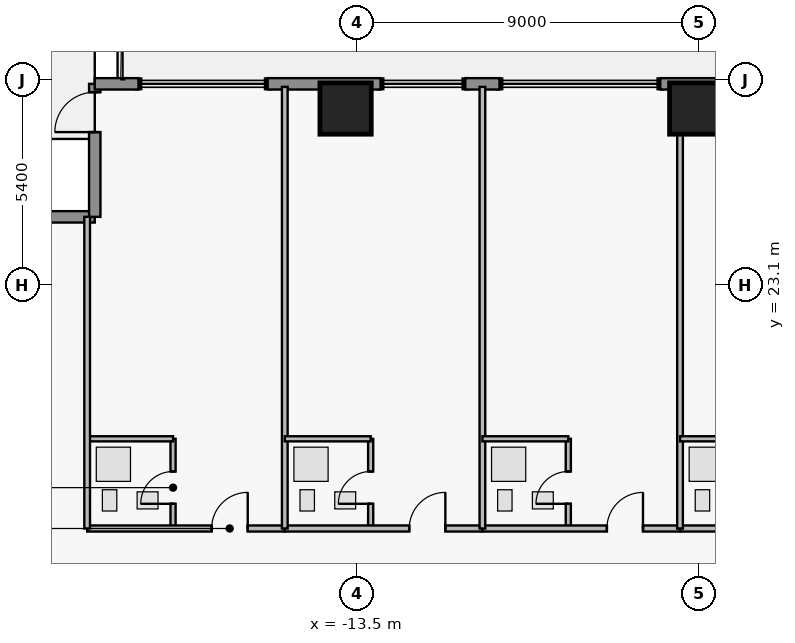
"""IFC4 building model, lengths in metres.
Left out: names, types, materials, properties, quantities, classifications, styles, units other than length and angle.
Written with IfcOpenShell. Run it as: python <this file> out.ifc"""

import sys

from ifc_helpers import new_model, si_unit, direction, frame, frame_2d, origin, origin_2d, place, context, subcontext, project, spatial, rectangle, extrude, element, fill, save


model = new_model("IFC4")
c1 = context("Model", 3, precision=1e-05, world=origin(), true_north=direction((0.0, 1.0)))
c2 = subcontext(c1, "Body", "Model", "MODEL_VIEW")
j1 = project(units=[si_unit("LENGTHUNIT", "METRE"), si_unit("PLANEANGLEUNIT", "RADIAN")], contexts=[c1])
p1 = place(None, origin())
s1 = spatial("IfcSite", under=j1, at=p1, CompositionType="ELEMENT")
p2 = place(p1, origin())
s2 = spatial("IfcBuilding", under=s1, at=p2, CompositionType="ELEMENT")
p3 = place(p2, frame((0.0, 0.0, 110.25)))
s3 = spatial("IfcBuildingStorey", under=s2, at=p3, CompositionType="ELEMENT", Elevation=110.25)
for number, where, z_axis, x_axis in (
    (1, (-13.8, 27.75, 0.0), (0.0, 0.0, 1.0), (1.0, 0.0, 0.0)),
    (2, (-4.6, 27.75, 0.0), (0.0, 0.0, 1.0), (1.0, 0.0, 0.0)),
):
    element("IfcColumn", number, at=place(p3, frame(where, z_axis=z_axis, x_axis=x_axis)), inside=s3, PredefinedType="COLUMN", context=c2, shape_type="SweptSolid", body=[
        extrude(rectangle(XDim=1.35, YDim=1.35, at=origin_2d()), origin(), (0.0, 0.0, 1.0), 3.65),
    ])
p4 = place(p3, frame((-23.9, 24.9, 0.0), z_axis=(0.0, 0.0, 1.0), x_axis=(1.0, 0.0, 0.0)))
e3 = element("IfcWall", 3, at=p4, inside=s3, PredefinedType="STANDARD", context=c2, shape_type="SweptSolid", body=[
    extrude(rectangle(XDim=3.5, YDim=0.3, at=frame_2d((1.75, 0.0))), origin(), (0.0, 0.0, 1.0), 3.43),
])
p5 = place(p3, frame((-20.4, 24.9, 0.0), z_axis=(0.0, 0.0, 1.0), x_axis=(0.0, 1.0, 0.0)))
e4 = element("IfcWall", 4, at=p5, inside=s3, PredefinedType="STANDARD", context=c2, shape_type="SweptSolid", body=[
    extrude(rectangle(XDim=3.5, YDim=0.3, at=frame_2d((1.75, 0.0))), origin(), (0.0, 0.0, 1.0), 3.43),
])
p6 = place(p5, frame((2.23, 0.0, 0.0)))
e5 = element("IfcOpeningElement", 5, at=p6, cuts=e4, PredefinedType="OPENING", context=c2, shape_type="SweptSolid", body=[
    extrude(rectangle(XDim=1.05, YDim=2.2, at=frame_2d((0.525, 1.1))), frame((0.0, 0.16, 0.0), z_axis=(0.0, -1.0, 0.0), x_axis=(1.0, 0.0, 0.0)), (0.0, 0.0, 1.0), 0.32),
])
p7 = place(p3, frame((-20.4, 28.4, 0.0), z_axis=(0.0, 0.0, 1.0), x_axis=(1.0, 0.0, 0.0)))
e6 = element("IfcWall", 6, at=p7, inside=s3, PredefinedType="STANDARD", context=c2, shape_type="SweptSolid", body=[
    extrude(rectangle(XDim=1.15, YDim=0.3, at=frame_2d((0.575, 0.0))), origin(), (0.0, 0.0, 1.0), 3.43),
])
p8 = place(p3, frame((-15.85, 28.4, 0.0), z_axis=(0.0, 0.0, 1.0), x_axis=(1.0, 0.0, 0.0)))
e7 = element("IfcWall", 7, at=p8, inside=s3, PredefinedType="STANDARD", context=c2, shape_type="SweptSolid", body=[
    extrude(rectangle(XDim=2.97, YDim=0.3, at=frame_2d((1.485, 0.0))), origin(), (0.0, 0.0, 1.0), 3.43),
])
p9 = place(p3, frame((-10.65, 28.4, 0.0), z_axis=(0.0, 0.0, 1.0), x_axis=(1.0, 0.0, 0.0)))
e8 = element("IfcWall", 8, at=p9, inside=s3, PredefinedType="STANDARD", context=c2, shape_type="SweptSolid", body=[
    extrude(rectangle(XDim=0.9, YDim=0.3, at=frame_2d((0.45, 0.0))), origin(), (0.0, 0.0, 1.0), 3.43),
])
p10 = place(p3, frame((-5.52, 28.4, 0.0), z_axis=(0.0, 0.0, 1.0), x_axis=(1.0, 0.0, 0.0)))
e9 = element("IfcWall", 9, at=p10, inside=s3, PredefinedType="STANDARD", context=c2, shape_type="SweptSolid", body=[
    extrude(rectangle(XDim=1.84, YDim=0.3, at=frame_2d((0.92, 0.0))), origin(), (0.0, 0.0, 1.0), 3.43),
])
p11 = place(p3, frame((-18.34, 16.7, 0.0), z_axis=(0.0, 0.0, 1.0), x_axis=(0.0, 1.0, 0.0)))
e10 = element("IfcWall", 10, at=p11, inside=s3, PredefinedType="PLUMBINGWALL", context=c2, shape_type="SweptSolid", body=[
    extrude(rectangle(XDim=2.36, YDim=0.135, at=frame_2d((1.18, 0.0))), origin(), (0.0, 0.0, 1.0), 3.43),
])
p12 = place(p11, frame((0.65, 0.0, 0.0)))
e11 = element("IfcOpeningElement", 11, at=p12, cuts=e10, PredefinedType="OPENING", context=c2, shape_type="SweptSolid", body=[
    extrude(rectangle(XDim=0.85, YDim=2.1, at=frame_2d((0.425, 1.05))), frame((0.0, 0.077, 0.0), z_axis=(0.0, -1.0, 0.0), x_axis=(1.0, 0.0, 0.0)), (0.0, 0.0, 1.0), 0.155),
])
p13 = place(p3, frame((-20.6, 16.7, 0.0), z_axis=(0.0, 0.0, 1.0), x_axis=(1.0, 0.0, 0.0)))
e12 = element("IfcWall", 12, at=p13, inside=s3, PredefinedType="PARTITIONING", context=c2, shape_type="SweptSolid", body=[
    extrude(rectangle(XDim=5.2, YDim=0.16, at=frame_2d((2.6, 0.0))), origin(), (0.0, 0.0, 1.0), 3.43),
])
p14 = place(p13, frame((3.275, 0.0, 0.0)))
e13 = element("IfcOpeningElement", 13, at=p14, cuts=e12, PredefinedType="OPENING", context=c2, shape_type="SweptSolid", body=[
    extrude(rectangle(XDim=0.95, YDim=2.15, at=frame_2d((0.475, 1.075))), frame((0.0, 0.09, 0.0), z_axis=(0.0, -1.0, 0.0), x_axis=(1.0, 0.0, 0.0)), (0.0, 0.0, 1.0), 0.18),
])
p15 = place(p3, frame((-13.14, 16.7, 0.0), z_axis=(0.0, 0.0, 1.0), x_axis=(0.0, 1.0, 0.0)))
e14 = element("IfcWall", 14, at=p15, inside=s3, PredefinedType="PLUMBINGWALL", context=c2, shape_type="SweptSolid", body=[
    extrude(rectangle(XDim=2.36, YDim=0.135, at=frame_2d((1.18, 0.0))), origin(), (0.0, 0.0, 1.0), 3.43),
])
p16 = place(p15, frame((0.65, 0.0, 0.0)))
e15 = element("IfcOpeningElement", 15, at=p16, cuts=e14, PredefinedType="OPENING", context=c2, shape_type="SweptSolid", body=[
    extrude(rectangle(XDim=0.85, YDim=2.1, at=frame_2d((0.425, 1.05))), frame((0.0, 0.077, 0.0), z_axis=(0.0, -1.0, 0.0), x_axis=(1.0, 0.0, 0.0)), (0.0, 0.0, 1.0), 0.155),
])
p17 = place(p3, frame((-15.4, 16.7, 0.0), z_axis=(0.0, 0.0, 1.0), x_axis=(1.0, 0.0, 0.0)))
e16 = element("IfcWall", 16, at=p17, inside=s3, PredefinedType="PARTITIONING", context=c2, shape_type="SweptSolid", body=[
    extrude(rectangle(XDim=5.2, YDim=0.16, at=frame_2d((2.6, 0.0))), origin(), (0.0, 0.0, 1.0), 2.973),
])
p18 = place(p17, frame((3.275, 0.0, 0.0)))
e17 = element("IfcOpeningElement", 17, at=p18, cuts=e16, PredefinedType="OPENING", context=c2, shape_type="SweptSolid", body=[
    extrude(rectangle(XDim=0.95, YDim=2.15, at=frame_2d((0.475, 1.075))), frame((0.0, 0.09, 0.0), z_axis=(0.0, -1.0, 0.0), x_axis=(1.0, 0.0, 0.0)), (0.0, 0.0, 1.0), 0.18),
])
p19 = place(p3, frame((-7.94, 16.7, 0.0), z_axis=(0.0, 0.0, 1.0), x_axis=(0.0, 1.0, 0.0)))
e18 = element("IfcWall", 18, at=p19, inside=s3, PredefinedType="PLUMBINGWALL", context=c2, shape_type="SweptSolid", body=[
    extrude(rectangle(XDim=2.36, YDim=0.135, at=frame_2d((1.18, 0.0))), origin(), (0.0, 0.0, 1.0), 3.43),
])
p20 = place(p19, frame((0.65, 0.0, 0.0)))
e19 = element("IfcOpeningElement", 19, at=p20, cuts=e18, PredefinedType="OPENING", context=c2, shape_type="SweptSolid", body=[
    extrude(rectangle(XDim=0.85, YDim=2.1, at=frame_2d((0.425, 1.05))), frame((0.0, 0.077, 0.0), z_axis=(0.0, -1.0, 0.0), x_axis=(1.0, 0.0, 0.0)), (0.0, 0.0, 1.0), 0.155),
])
p21 = place(p3, frame((-10.2, 16.7, 0.0), z_axis=(0.0, 0.0, 1.0), x_axis=(1.0, 0.0, 0.0)))
e20 = element("IfcWall", 20, at=p21, inside=s3, PredefinedType="PARTITIONING", context=c2, shape_type="SweptSolid", body=[
    extrude(rectangle(XDim=5.2, YDim=0.16, at=frame_2d((2.6, 0.0))), origin(), (0.0, 0.0, 1.0), 2.973),
])
p22 = place(p21, frame((3.275, 0.0, 0.0)))
e21 = element("IfcOpeningElement", 21, at=p22, cuts=e20, PredefinedType="OPENING", context=c2, shape_type="SweptSolid", body=[
    extrude(rectangle(XDim=0.95, YDim=2.15, at=frame_2d((0.475, 1.075))), frame((0.0, 0.09, 0.0), z_axis=(0.0, -1.0, 0.0), x_axis=(1.0, 0.0, 0.0)), (0.0, 0.0, 1.0), 0.18),
])
p23 = place(p3, frame((-5.0, 16.7, 0.0), z_axis=(0.0, 0.0, 1.0), x_axis=(1.0, 0.0, 0.0)))
e22 = element("IfcWall", 22, at=p23, inside=s3, PredefinedType="PARTITIONING", context=c2, shape_type="SweptSolid", body=[
    extrude(rectangle(XDim=5.2, YDim=0.16, at=frame_2d((2.6, 0.0))), origin(), (0.0, 0.0, 1.0), 2.973),
])
p24 = place(p23, frame((3.275, 0.0, 0.0)))
e23 = element("IfcOpeningElement", 23, at=p24, cuts=e22, PredefinedType="OPENING", context=c2, shape_type="SweptSolid", body=[
    extrude(rectangle(XDim=0.95, YDim=2.15, at=frame_2d((0.475, 1.075))), frame((0.0, 0.09, 0.0), z_axis=(0.0, -1.0, 0.0), x_axis=(1.0, 0.0, 0.0)), (0.0, 0.0, 1.0), 0.18),
])
p25 = place(p3, frame((-20.6, 19.06, 0.0), z_axis=(0.0, 0.0, 1.0), x_axis=(1.0, 0.0, 0.0)))
e24 = element("IfcWall", 24, at=p25, inside=s3, PredefinedType="PLUMBINGWALL", context=c2, shape_type="SweptSolid", body=[
    extrude(rectangle(XDim=2.26, YDim=0.135, at=frame_2d((1.13, 0.0))), origin(), (0.0, 0.0, 1.0), 3.43),
])
p26 = place(p3, frame((-20.6, 16.7, 0.0), z_axis=(0.0, 0.0, 1.0), x_axis=(0.0, 1.0, 0.0)))
e25 = element("IfcWall", 25, at=p26, inside=s3, PredefinedType="PARTITIONING", context=c2, shape_type="SweptSolid", body=[
    extrude(rectangle(XDim=8.2, YDim=0.15, at=frame_2d((4.1, 0.0))), origin(), (0.0, 0.0, 1.0), 3.43),
])
p27 = place(p3, frame((-15.4, 16.7, 0.0), z_axis=(0.0, 0.0, 1.0), x_axis=(0.0, 1.0, 0.0)))
e26 = element("IfcWall", 26, at=p27, inside=s3, PredefinedType="PARTITIONING", context=c2, shape_type="SweptSolid", body=[
    extrude(rectangle(XDim=11.62, YDim=0.15, at=frame_2d((5.81, 0.0))), origin(), (0.0, 0.0, 1.0), 3.43),
])
p28 = place(p3, frame((-15.4, 19.06, 0.0), z_axis=(0.0, 0.0, 1.0), x_axis=(1.0, 0.0, 0.0)))
e27 = element("IfcWall", 27, at=p28, inside=s3, PredefinedType="PLUMBINGWALL", context=c2, shape_type="SweptSolid", body=[
    extrude(rectangle(XDim=2.26, YDim=0.135, at=frame_2d((1.13, 0.0))), origin(), (0.0, 0.0, 1.0), 2.973),
])
p29 = place(p3, frame((-10.2, 16.7, 0.0), z_axis=(0.0, 0.0, 1.0), x_axis=(0.0, 1.0, 0.0)))
e28 = element("IfcWall", 28, at=p29, inside=s3, PredefinedType="PARTITIONING", context=c2, shape_type="SweptSolid", body=[
    extrude(rectangle(XDim=11.62, YDim=0.15, at=frame_2d((5.81, 0.0))), origin(), (0.0, 0.0, 1.0), 3.43),
])
p30 = place(p3, frame((-10.2, 19.06, 0.0), z_axis=(0.0, 0.0, 1.0), x_axis=(1.0, 0.0, 0.0)))
e29 = element("IfcWall", 29, at=p30, inside=s3, PredefinedType="PLUMBINGWALL", context=c2, shape_type="SweptSolid", body=[
    extrude(rectangle(XDim=2.26, YDim=0.135, at=frame_2d((1.13, 0.0))), origin(), (0.0, 0.0, 1.0), 2.973),
])
p31 = place(p3, frame((-5.0, 16.7, 0.0), z_axis=(0.0, 0.0, 1.0), x_axis=(0.0, 1.0, 0.0)))
e30 = element("IfcWall", 30, at=p31, inside=s3, PredefinedType="PARTITIONING", context=c2, shape_type="SweptSolid", body=[
    extrude(rectangle(XDim=11.62, YDim=0.15, at=frame_2d((5.81, 0.0))), origin(), (0.0, 0.0, 1.0), 2.503),
])
p32 = place(p3, frame((-5.0, 19.06, 0.0), z_axis=(0.0, 0.0, 1.0), x_axis=(1.0, 0.0, 0.0)))
e31 = element("IfcWall", 31, at=p32, inside=s3, PredefinedType="PLUMBINGWALL", context=c2, shape_type="SweptSolid", body=[
    extrude(rectangle(XDim=2.26, YDim=0.135, at=frame_2d((1.13, 0.0))), origin(), (0.0, 0.0, 1.0), 2.973),
])
p33 = place(p6, origin())
e32 = element("IfcDoor", 32, at=p33, inside=s3, OperationType="SINGLE_SWING_LEFT", PredefinedType="DOOR", context=c2, shape_type="SweptSolid", body=[
    extrude(rectangle(XDim=1.05, YDim=2.2, at=frame_2d((0.525, 1.1))), frame((0.0, 0.025, 0.0), z_axis=(0.0, -1.0, 0.0), x_axis=(1.0, 0.0, 0.0)), (0.0, 0.0, 1.0), 0.05),
])
fill(e5, e32)
p34 = place(p12, origin())
e33 = element("IfcDoor", 33, at=p34, inside=s3, OperationType="SINGLE_SWING_LEFT", PredefinedType="DOOR", context=c2, shape_type="SweptSolid", body=[
    extrude(rectangle(XDim=0.85, YDim=2.1, at=frame_2d((0.425, 1.05))), frame((0.0, 0.025, 0.0), z_axis=(0.0, -1.0, 0.0), x_axis=(1.0, 0.0, 0.0)), (0.0, 0.0, 1.0), 0.05),
])
fill(e11, e33)
p35 = place(p14, origin())
e34 = element("IfcDoor", 34, at=p35, inside=s3, OperationType="SINGLE_SWING_RIGHT", PredefinedType="DOOR", context=c2, shape_type="SweptSolid", body=[
    extrude(rectangle(XDim=0.95, YDim=2.15, at=frame_2d((0.475, 1.075))), frame((0.0, 0.025, 0.0), z_axis=(0.0, -1.0, 0.0), x_axis=(1.0, 0.0, 0.0)), (0.0, 0.0, 1.0), 0.05),
])
fill(e13, e34)
p36 = place(p16, origin())
e35 = element("IfcDoor", 35, at=p36, inside=s3, OperationType="SINGLE_SWING_LEFT", PredefinedType="DOOR", context=c2, shape_type="SweptSolid", body=[
    extrude(rectangle(XDim=0.85, YDim=2.1, at=frame_2d((0.425, 1.05))), frame((0.0, 0.025, 0.0), z_axis=(0.0, -1.0, 0.0), x_axis=(1.0, 0.0, 0.0)), (0.0, 0.0, 1.0), 0.05),
])
fill(e15, e35)
p37 = place(p18, origin())
e36 = element("IfcDoor", 36, at=p37, inside=s3, OperationType="SINGLE_SWING_RIGHT", PredefinedType="DOOR", context=c2, shape_type="SweptSolid", body=[
    extrude(rectangle(XDim=0.95, YDim=2.15, at=frame_2d((0.475, 1.075))), frame((0.0, 0.025, 0.0), z_axis=(0.0, -1.0, 0.0), x_axis=(1.0, 0.0, 0.0)), (0.0, 0.0, 1.0), 0.05),
])
fill(e17, e36)
p38 = place(p20, origin())
e37 = element("IfcDoor", 37, at=p38, inside=s3, OperationType="SINGLE_SWING_LEFT", PredefinedType="DOOR", context=c2, shape_type="SweptSolid", body=[
    extrude(rectangle(XDim=0.85, YDim=2.1, at=frame_2d((0.425, 1.05))), frame((0.0, 0.025, 0.0), z_axis=(0.0, -1.0, 0.0), x_axis=(1.0, 0.0, 0.0)), (0.0, 0.0, 1.0), 0.05),
])
fill(e19, e37)
p39 = place(p22, origin())
e38 = element("IfcDoor", 38, at=p39, inside=s3, OperationType="SINGLE_SWING_RIGHT", PredefinedType="DOOR", context=c2, shape_type="SweptSolid", body=[
    extrude(rectangle(XDim=0.95, YDim=2.15, at=frame_2d((0.475, 1.075))), frame((0.0, 0.025, 0.0), z_axis=(0.0, -1.0, 0.0), x_axis=(1.0, 0.0, 0.0)), (0.0, 0.0, 1.0), 0.05),
])
fill(e21, e38)
save(model, sys.argv[1])
